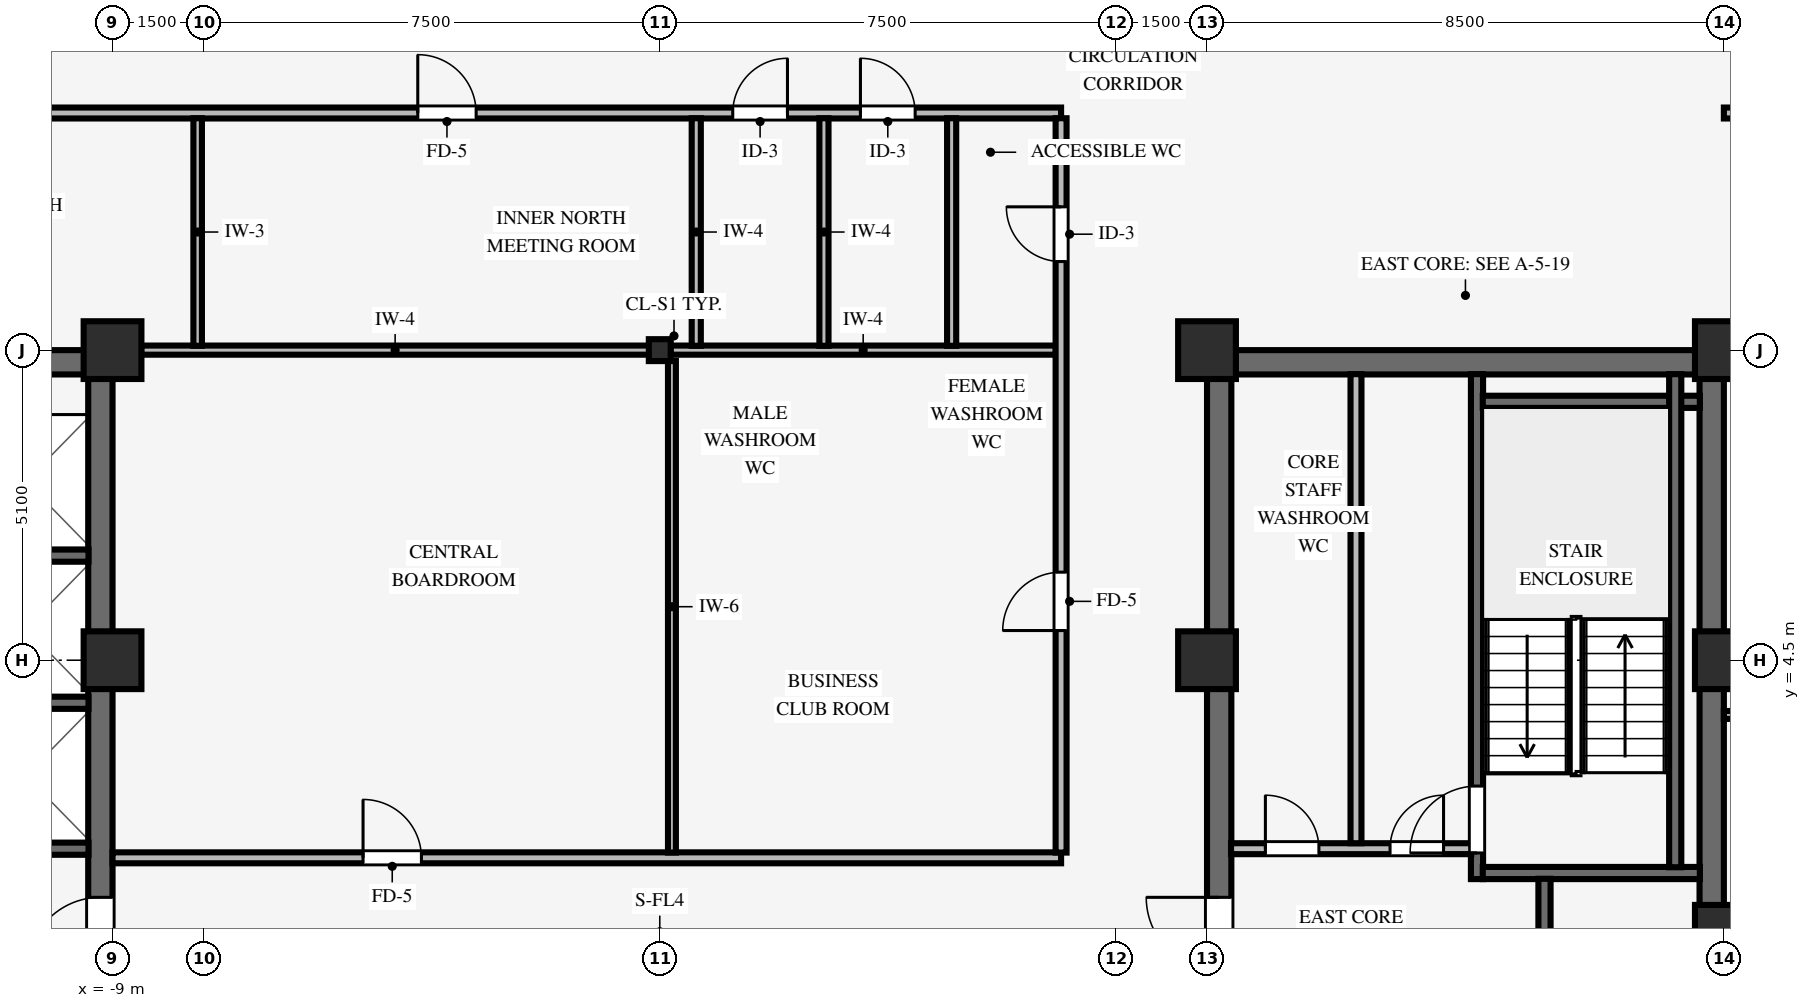
"""IFC4 building model, lengths in metres.
Left out: names, types, materials, properties, quantities, classifications, styles, units other than length and angle.
Written with IfcOpenShell. Run it as: python <this file> out.ifc"""

import sys

from ifc_helpers import new_model, si_unit, direction, frame, frame_2d, origin, origin_2d, place, context, subcontext, project, spatial, rectangle, i_section, extrude, source, transform, mapped, element, fill, save


model = new_model("IFC4")
c1 = context("Model", 3, precision=1e-05, world=origin(), true_north=direction((0.0, 1.0)))
c2 = subcontext(c1, "Body", "Model", "MODEL_VIEW")
j1 = project(units=[si_unit("LENGTHUNIT", "METRE"), si_unit("PLANEANGLEUNIT", "RADIAN")], contexts=[c1])
p1 = place(None, origin())
s1 = spatial("IfcSite", under=j1, at=p1, CompositionType="ELEMENT")
p2 = place(p1, origin())
s2 = spatial("IfcBuilding", under=s1, at=p2, CompositionType="ELEMENT")
p3 = place(p2, frame((0.0, 0.0, 142.1)))
s3 = spatial("IfcBuildingStorey", under=s2, at=p3, CompositionType="ELEMENT", Elevation=142.1)
p4 = place(p3, frame((-17.5, 9.4, 0.0), z_axis=(0.0, 0.0, 1.0), x_axis=(1.0, 0.0, 0.0)))
e1 = element("IfcWall", 1, at=p4, inside=s3, PredefinedType="SHEAR", context=c2, shape_type="SweptSolid", body=[
    extrude(rectangle(XDim=8.5, YDim=0.4, at=frame_2d((4.25, 0.0))), origin(), (0.0, 0.0, 1.0), 3.37),
])
p5 = place(p3, frame((-9.2, -9.205, 0.0), z_axis=(0.0, 0.0, 1.0), x_axis=(0.0, 1.0, 0.0)))
e2 = element("IfcWall", 2, at=p5, inside=s3, PredefinedType="SHEAR", context=c2, shape_type="SweptSolid", body=[
    extrude(rectangle(XDim=18.41, YDim=0.4, at=frame_2d((9.205, 0.0))), origin(), (0.0, 0.0, 1.0), 3.37),
])
p6 = place(p5, frame((8.605, 0.0, 0.0)))
e3 = element("IfcOpeningElement", 3, at=p6, cuts=e2, PredefinedType="OPENING", context=c2, shape_type="SweptSolid", body=[
    extrude(rectangle(XDim=1.2, YDim=2.15, at=frame_2d((0.6, 1.075))), frame((0.0, 0.21, 0.0), z_axis=(0.0, -1.0, 0.0), x_axis=(1.0, 0.0, 0.0)), (0.0, 0.0, 1.0), 0.42),
])
p7 = place(p3, frame((9.0, 9.4, 0.0), z_axis=(0.0, 0.0, 1.0), x_axis=(1.0, 0.0, 0.0)))
e4 = element("IfcWall", 4, at=p7, inside=s3, PredefinedType="SHEAR", context=c2, shape_type="SweptSolid", body=[
    extrude(rectangle(XDim=8.5, YDim=0.4, at=frame_2d((4.25, 0.0))), origin(), (0.0, 0.0, 1.0), 3.37),
])
p8 = place(p3, frame((9.2, -9.205, 0.0), z_axis=(0.0, 0.0, 1.0), x_axis=(0.0, 1.0, 0.0)))
e5 = element("IfcWall", 5, at=p8, inside=s3, PredefinedType="SHEAR", context=c2, shape_type="SweptSolid", body=[
    extrude(rectangle(XDim=18.41, YDim=0.4, at=frame_2d((9.205, 0.0))), origin(), (0.0, 0.0, 1.0), 3.37),
])
p9 = place(p8, frame((8.605, 0.0, 0.0)))
e6 = element("IfcOpeningElement", 6, at=p9, cuts=e5, PredefinedType="OPENING", context=c2, shape_type="SweptSolid", body=[
    extrude(rectangle(XDim=1.2, YDim=2.15, at=frame_2d((0.6, 1.075))), frame((0.0, 0.21, 0.0), z_axis=(0.0, -1.0, 0.0), x_axis=(1.0, 0.0, 0.0)), (0.0, 0.0, 1.0), 0.42),
])
p10 = place(p3, frame((17.3, -9.205, 0.0), z_axis=(0.0, 0.0, 1.0), x_axis=(0.0, 1.0, 0.0)))
e7 = element("IfcWall", 7, at=p10, inside=s3, PredefinedType="SHEAR", context=c2, shape_type="SweptSolid", body=[
    extrude(rectangle(XDim=18.41, YDim=0.4, at=frame_2d((9.205, 0.0))), origin(), (0.0, 0.0, 1.0), 3.37),
])
for number, where, z_axis, x_axis in (
    (8, (-9.0, 4.5, 0.0), (0.0, 0.0, 1.0), (1.0, 0.0, 0.0)),
    (9, (-9.0, 9.6, 0.0), (0.0, 0.0, 1.0), (1.0, 0.0, 0.0)),
    (10, (9.0, 4.5, 0.0), (0.0, 0.0, 1.0), (1.0, 0.0, 0.0)),
    (11, (9.0, 9.6, 0.0), (0.0, 0.0, 1.0), (1.0, 0.0, 0.0)),
    (12, (17.5, 4.5, 0.0), (0.0, 0.0, 1.0), (1.0, 0.0, 0.0)),
    (13, (17.5, 9.6, 0.0), (0.0, 0.0, 1.0), (1.0, 0.0, 0.0)),
    (14, (17.5, 0.0, 0.0), (0.0, 0.0, 1.0), (1.0, 0.0, 0.0)),
):
    element("IfcColumn", number, at=place(p3, frame(where, z_axis=z_axis, x_axis=x_axis)), inside=s3, PredefinedType="COLUMN", context=c2, shape_type="SweptSolid", body=[
        extrude(rectangle(XDim=0.95, YDim=0.95, at=origin_2d()), origin(), (0.0, 0.0, 1.0), 3.37),
    ])
p11 = place(p3, frame((0.0, 9.6, 0.0), z_axis=(0.0, 0.0, 1.0), x_axis=(1.0, 0.0, 0.0)))
e15 = element("IfcColumn", 15, at=p11, inside=s3, PredefinedType="COLUMN", context=c2, shape_type="SweptSolid", body=[
    extrude(i_section(OverallWidth=0.36, OverallDepth=0.36, WebThickness=0.021, FlangeThickness=0.021, FilletRadius=0.018, at=origin_2d()), origin(), (0.0, 0.0, 1.0), 3.37),
])
for number, where, z_axis, x_axis in (
    (16, (-11.505, 1.4, 0.0), (0.0, 0.0, 1.0), (1.0, 0.0, 0.0)),
    (17, (-11.505, 3.8, 0.0), (0.0, 0.0, 1.0), (1.0, 0.0, 0.0)),
    (18, (-11.505, 6.22, 0.0), (0.0, 0.0, 1.0), (1.0, 0.0, 0.0)),
):
    element("IfcWall", number, at=place(p3, frame(where, z_axis=z_axis, x_axis=x_axis)), inside=s3, PredefinedType="SHEAR", context=c2, shape_type="SweptSolid", body=[
        extrude(rectangle(XDim=2.11, YDim=0.2, at=frame_2d((1.055, 0.0))), origin(), (0.0, 0.0, 1.0), 3.37),
    ])
p12 = place(p3, frame((13.44, 0.9, 0.0), z_axis=(0.0, 0.0, 1.0), x_axis=(0.0, 1.0, 0.0)))
e19 = element("IfcWall", 19, at=p12, inside=s3, PredefinedType="SHEAR", context=c2, shape_type="SweptSolid", body=[
    extrude(rectangle(XDim=8.305, YDim=0.2, at=frame_2d((4.153, 0.0))), origin(), (0.0, 0.0, 1.0), 3.37),
])
p13 = place(p12, frame((0.43, 0.0, 0.0)))
e20 = element("IfcOpeningElement", 20, at=p13, cuts=e19, PredefinedType="OPENING", context=c2, shape_type="SweptSolid", body=[
    extrude(rectangle(XDim=1.1, YDim=2.15, at=frame_2d((0.55, 1.075))), frame((0.0, 0.11, 0.0), z_axis=(0.0, -1.0, 0.0), x_axis=(1.0, 0.0, 0.0)), (0.0, 0.0, 1.0), 0.22),
])
for number, where, z_axis, x_axis in (
    (21, (13.535, 1.0, 0.0), (0.0, 0.0, 1.0), (1.0, 0.0, 0.0)),
    (22, (13.535, 8.75, 0.0), (0.0, 0.0, 1.0), (1.0, 0.0, 0.0)),
):
    element("IfcWall", number, at=place(p3, frame(where, z_axis=z_axis, x_axis=x_axis)), inside=s3, PredefinedType="SHEAR", context=c2, shape_type="SweptSolid", body=[
        extrude(rectangle(XDim=3.57, YDim=0.2, at=frame_2d((1.785, 0.0))), origin(), (0.0, 0.0, 1.0), 3.37),
    ])
p14 = place(p3, frame((16.7, 1.095, 0.0), z_axis=(0.0, 0.0, 1.0), x_axis=(0.0, 1.0, 0.0)))
e23 = element("IfcWall", 23, at=p14, inside=s3, PredefinedType="SHEAR", context=c2, shape_type="SweptSolid", body=[
    extrude(rectangle(XDim=8.11, YDim=0.2, at=frame_2d((4.055, 0.0))), origin(), (0.0, 0.0, 1.0), 3.37),
])
p15 = place(p3, frame((14.55, -9.205, 0.0), z_axis=(0.0, 0.0, 1.0), x_axis=(0.0, 1.0, 0.0)))
e24 = element("IfcWall", 24, at=p15, inside=s3, PredefinedType="SHEAR", context=c2, shape_type="SweptSolid", body=[
    extrude(rectangle(XDim=10.11, YDim=0.2, at=frame_2d((5.055, 0.0))), origin(), (0.0, 0.0, 1.0), 3.37),
])
p16 = place(p15, frame((6.565, 0.0, 0.0)))
e25 = element("IfcOpeningElement", 25, at=p16, cuts=e24, PredefinedType="OPENING", context=c2, shape_type="SweptSolid", body=[
    extrude(rectangle(XDim=0.88, YDim=2.1, at=frame_2d((0.44, 1.05))), frame((0.0, 0.11, 0.0), z_axis=(0.0, -1.0, 0.0), x_axis=(1.0, 0.0, 0.0)), (0.0, 0.0, 1.0), 0.22),
])
p17 = place(p15, frame((0.93, 0.0, 0.0)))
e26 = element("IfcOpeningElement", 26, at=p17, cuts=e24, PredefinedType="OPENING", context=c2, shape_type="SweptSolid", body=[
    extrude(rectangle(XDim=1.15, YDim=2.15, at=frame_2d((0.575, 1.075))), frame((0.0, 0.11, 0.0), z_axis=(0.0, -1.0, 0.0), x_axis=(1.0, 0.0, 0.0)), (0.0, 0.0, 1.0), 0.22),
])
p18 = place(p3, frame((9.395, 1.4, 0.0), z_axis=(0.0, 0.0, 1.0), x_axis=(1.0, 0.0, 0.0)))
e27 = element("IfcWall", 27, at=p18, inside=s3, PredefinedType="PARTITIONING", context=c2, shape_type="SweptSolid", body=[
    extrude(rectangle(XDim=3.95, YDim=0.18, at=frame_2d((1.975, 0.0))), origin(), (0.0, 0.0, 1.0), 3.36),
])
p19 = place(p18, frame((0.565, 0.0, 0.0)))
e28 = element("IfcOpeningElement", 28, at=p19, cuts=e27, PredefinedType="OPENING", context=c2, shape_type="SweptSolid", body=[
    extrude(rectangle(XDim=0.88, YDim=2.1, at=frame_2d((0.44, 1.05))), frame((0.0, 0.1, 0.0), z_axis=(0.0, -1.0, 0.0), x_axis=(1.0, 0.0, 0.0)), (0.0, 0.0, 1.0), 0.2),
])
p20 = place(p18, frame((2.615, 0.0, 0.0)))
e29 = element("IfcOpeningElement", 29, at=p20, cuts=e27, PredefinedType="OPENING", context=c2, shape_type="SweptSolid", body=[
    extrude(rectangle(XDim=0.88, YDim=2.1, at=frame_2d((0.44, 1.05))), frame((0.0, 0.1, 0.0), z_axis=(0.0, -1.0, 0.0), x_axis=(1.0, 0.0, 0.0)), (0.0, 0.0, 1.0), 0.2),
])
p21 = place(p3, frame((11.45, 1.49, 0.0), z_axis=(0.0, 0.0, 1.0), x_axis=(0.0, 1.0, 0.0)))
e30 = element("IfcWall", 30, at=p21, inside=s3, PredefinedType="PARTITIONING", context=c2, shape_type="SweptSolid", body=[
    extrude(rectangle(XDim=7.715, YDim=0.18, at=frame_2d((3.857, 0.0))), origin(), (0.0, 0.0, 1.0), 3.36),
])
p22 = place(p3, frame((-9.0, 1.25, 0.0), z_axis=(0.0, 0.0, 1.0), x_axis=(1.0, 0.0, 0.0)))
e31 = element("IfcWall", 31, at=p22, inside=s3, PredefinedType="PARTITIONING", context=c2, shape_type="SweptSolid", body=[
    extrude(rectangle(XDim=15.6, YDim=0.18, at=frame_2d((7.8, 0.0))), origin(), (0.0, 0.0, 1.0), 3.36),
])
p23 = place(p22, frame((4.12, 0.0, 0.0)))
e32 = element("IfcOpeningElement", 32, at=p23, cuts=e31, PredefinedType="OPENING", context=c2, shape_type="SweptSolid", body=[
    extrude(rectangle(XDim=0.96, YDim=2.1, at=frame_2d((0.48, 1.05))), frame((0.0, 0.1, 0.0), z_axis=(0.0, -1.0, 0.0), x_axis=(1.0, 0.0, 0.0)), (0.0, 0.0, 1.0), 0.2),
])
p24 = place(p3, frame((17.5, 3.6, 0.0), z_axis=(0.0, 0.0, 1.0), x_axis=(1.0, 0.0, 0.0)))
e33 = element("IfcWall", 33, at=p24, inside=s3, PredefinedType="PARTITIONING", context=c2, shape_type="SweptSolid", body=[
    extrude(rectangle(XDim=8.58, YDim=0.13, at=frame_2d((4.29, 0.0))), origin(), (0.0, 0.0, 1.0), 3.36),
])
p25 = place(p3, frame((-8.529, 9.6, 0.0), z_axis=(0.0, 0.0, 1.0), x_axis=(1.0, 0.0, 0.0)))
e34 = element("IfcWall", 34, at=p25, inside=s3, PredefinedType="PARTITIONING", context=c2, shape_type="SweptSolid", body=[
    extrude(rectangle(XDim=8.353, YDim=0.15, at=frame_2d((4.177, 0.0))), origin(), (0.0, 0.0, 1.0), 2.405),
])
p26 = place(p3, frame((0.176, 9.6, 0.0), z_axis=(0.0, 0.0, 1.0), x_axis=(1.0, 0.0, 0.0)))
e35 = element("IfcWall", 35, at=p26, inside=s3, PredefinedType="PARTITIONING", context=c2, shape_type="SweptSolid", body=[
    extrude(rectangle(XDim=6.338, YDim=0.15, at=frame_2d((3.169, 0.0))), origin(), (0.0, 0.0, 1.0), 2.405),
])
p27 = place(p3, frame((-17.7, 13.5, 0.0), z_axis=(0.0, 0.0, 1.0), x_axis=(1.0, 0.0, 0.0)))
e36 = element("IfcWall", 36, at=p27, inside=s3, PredefinedType="PARTITIONING", context=c2, shape_type="SweptSolid", body=[
    extrude(rectangle(XDim=24.3, YDim=0.18, at=frame_2d((12.15, 0.0))), origin(), (0.0, 0.0, 1.0), 2.998),
])
p28 = place(p27, frame((4.57, 0.0, 0.0)))
e37 = element("IfcOpeningElement", 37, at=p28, cuts=e36, PredefinedType="OPENING", context=c2, shape_type="SweptSolid", body=[
    extrude(rectangle(XDim=0.96, YDim=2.1, at=frame_2d((0.48, 1.05))), frame((0.0, 0.1, 0.0), z_axis=(0.0, -1.0, 0.0), x_axis=(1.0, 0.0, 0.0)), (0.0, 0.0, 1.0), 0.2),
])
p29 = place(p27, frame((13.72, 0.0, 0.0)))
e38 = element("IfcOpeningElement", 38, at=p29, cuts=e36, PredefinedType="OPENING", context=c2, shape_type="SweptSolid", body=[
    extrude(rectangle(XDim=0.96, YDim=2.1, at=frame_2d((0.48, 1.05))), frame((0.0, 0.1, 0.0), z_axis=(0.0, -1.0, 0.0), x_axis=(1.0, 0.0, 0.0)), (0.0, 0.0, 1.0), 0.2),
])
p30 = place(p27, frame((18.9, 0.0, 0.0)))
e39 = element("IfcOpeningElement", 39, at=p30, cuts=e36, PredefinedType="OPENING", context=c2, shape_type="SweptSolid", body=[
    extrude(rectangle(XDim=0.9, YDim=2.1, at=frame_2d((0.45, 1.05))), frame((0.0, 0.1, 0.0), z_axis=(0.0, -1.0, 0.0), x_axis=(1.0, 0.0, 0.0)), (0.0, 0.0, 1.0), 0.2),
])
p31 = place(p27, frame((21.0, 0.0, 0.0)))
e40 = element("IfcOpeningElement", 40, at=p31, cuts=e36, PredefinedType="OPENING", context=c2, shape_type="SweptSolid", body=[
    extrude(rectangle(XDim=0.9, YDim=2.1, at=frame_2d((0.45, 1.05))), frame((0.0, 0.1, 0.0), z_axis=(0.0, -1.0, 0.0), x_axis=(1.0, 0.0, 0.0)), (0.0, 0.0, 1.0), 0.2),
])
p32 = place(p3, frame((17.5, 13.5, 0.0), z_axis=(0.0, 0.0, 1.0), x_axis=(1.0, 0.0, 0.0)))
e41 = element("IfcWall", 41, at=p32, inside=s3, PredefinedType="PARTITIONING", context=c2, shape_type="SweptSolid", body=[
    extrude(rectangle(XDim=3.3, YDim=0.18, at=frame_2d((1.65, 0.0))), origin(), (0.0, 0.0, 1.0), 2.998),
])
p33 = place(p3, frame((-7.6, 9.671, 0.0), z_axis=(0.0, 0.0, 1.0), x_axis=(0.0, 1.0, 0.0)))
e42 = element("IfcWall", 42, at=p33, inside=s3, PredefinedType="PARTITIONING", context=c2, shape_type="SweptSolid", body=[
    extrude(rectangle(XDim=3.743, YDim=0.14, at=frame_2d((1.872, 0.0))), origin(), (0.0, 0.0, 1.0), 3.36),
])
p34 = place(p3, frame((0.2, 1.336, 0.0), z_axis=(0.0, 0.0, 1.0), x_axis=(0.0, 1.0, 0.0)))
e43 = element("IfcWall", 43, at=p34, inside=s3, PredefinedType="PARTITIONING", context=c2, shape_type="SweptSolid", body=[
    extrude(rectangle(XDim=8.088, YDim=0.13, at=frame_2d((4.044, 0.0))), origin(), (0.0, 0.0, 1.0), 2.816),
])
for number, where, z_axis, x_axis in (
    (44, (0.6, 9.671, 0.0), (0.0, 0.0, 1.0), (0.0, 1.0, 0.0)),
    (45, (2.7, 9.671, 0.0), (0.0, 0.0, 1.0), (0.0, 1.0, 0.0)),
    (46, (4.8, 9.671, 0.0), (0.0, 0.0, 1.0), (0.0, 1.0, 0.0)),
):
    element("IfcWall", number, at=place(p3, frame(where, z_axis=z_axis, x_axis=x_axis)), inside=s3, PredefinedType="PARTITIONING", context=c2, shape_type="SweptSolid", body=[
        extrude(rectangle(XDim=3.743, YDim=0.15, at=frame_2d((1.872, 0.0))), origin(), (0.0, 0.0, 1.0), 3.36),
    ])
p35 = place(p3, frame((6.6, 1.336, 0.0), z_axis=(0.0, 0.0, 1.0), x_axis=(0.0, 1.0, 0.0)))
e47 = element("IfcWall", 47, at=p35, inside=s3, PredefinedType="PARTITIONING", context=c2, shape_type="SweptSolid", body=[
    extrude(rectangle(XDim=12.078, YDim=0.18, at=frame_2d((6.039, 0.0))), origin(), (0.0, 0.0, 1.0), 3.36),
])
p36 = place(p35, frame((3.652, 0.0, 0.0)))
e48 = element("IfcOpeningElement", 48, at=p36, cuts=e47, PredefinedType="OPENING", context=c2, shape_type="SweptSolid", body=[
    extrude(rectangle(XDim=0.96, YDim=2.1, at=frame_2d((0.48, 1.05))), frame((0.0, 0.1, 0.0), z_axis=(0.0, -1.0, 0.0), x_axis=(1.0, 0.0, 0.0)), (0.0, 0.0, 1.0), 0.2),
])
p37 = place(p35, frame((9.721, 0.0, 0.0)))
e49 = element("IfcOpeningElement", 49, at=p37, cuts=e47, PredefinedType="OPENING", context=c2, shape_type="SweptSolid", body=[
    extrude(rectangle(XDim=0.9, YDim=2.1, at=frame_2d((0.45, 1.05))), frame((0.0, 0.1, 0.0), z_axis=(0.0, -1.0, 0.0), x_axis=(1.0, 0.0, 0.0)), (0.0, 0.0, 1.0), 0.2),
])
m1 = source(origin(), c2, "Body", "SweptSolid", [
    extrude(rectangle(XDim=1.1, YDim=2.15, at=frame_2d((0.55, 1.075))), frame((0.0, 0.025, 0.0), z_axis=(0.0, -1.0, 0.0), x_axis=(1.0, 0.0, 0.0)), (0.0, 0.0, 1.0), 0.05),
])
p38 = place(p13, origin())
e50 = element("IfcDoor", 50, at=p38, inside=s3, OperationType="SINGLE_SWING_LEFT", PredefinedType="DOOR", context=c2, shape_type="MappedRepresentation", body=[
    mapped(m1, transform((0.0, 0.0, 0.0), scale=1.0)),
])
fill(e20, e50)
m2 = source(origin(), c2, "Body", "SweptSolid", [
    extrude(rectangle(XDim=1.2, YDim=2.15, at=frame_2d((0.6, 1.075))), frame((0.0, 0.025, 0.0), z_axis=(0.0, -1.0, 0.0), x_axis=(1.0, 0.0, 0.0)), (0.0, 0.0, 1.0), 0.05),
])
p39 = place(p6, origin())
e51 = element("IfcDoor", 51, at=p39, inside=s3, OperationType="SINGLE_SWING_LEFT", PredefinedType="DOOR", context=c2, shape_type="MappedRepresentation", body=[
    mapped(m2, transform((0.0, 0.0, 0.0), scale=1.0)),
])
fill(e3, e51)
p40 = place(p9, origin())
e52 = element("IfcDoor", 52, at=p40, inside=s3, OperationType="SINGLE_SWING_RIGHT", PredefinedType="DOOR", context=c2, shape_type="MappedRepresentation", body=[
    mapped(m2, transform((0.0, 0.0, 0.0), scale=1.0)),
])
fill(e6, e52)
m3 = source(origin(), c2, "Body", "SweptSolid", [
    extrude(rectangle(XDim=0.88, YDim=2.1, at=frame_2d((0.44, 1.05))), frame((0.0, 0.025, 0.0), z_axis=(0.0, -1.0, 0.0), x_axis=(1.0, 0.0, 0.0)), (0.0, 0.0, 1.0), 0.05),
])
p41 = place(p19, origin())
e53 = element("IfcDoor", 53, at=p41, inside=s3, OperationType="SINGLE_SWING_LEFT", PredefinedType="DOOR", context=c2, shape_type="MappedRepresentation", body=[
    mapped(m3, transform((0.0, 0.0, 0.0), scale=1.0)),
])
fill(e28, e53)
p42 = place(p20, origin())
e54 = element("IfcDoor", 54, at=p42, inside=s3, OperationType="SINGLE_SWING_RIGHT", PredefinedType="DOOR", context=c2, shape_type="MappedRepresentation", body=[
    mapped(m3, transform((0.0, 0.0, 0.0), scale=1.0)),
])
fill(e29, e54)
m4 = source(origin(), c2, "Body", "SweptSolid", [
    extrude(rectangle(XDim=0.96, YDim=2.1, at=frame_2d((0.48, 1.05))), frame((0.0, 0.025, 0.0), z_axis=(0.0, -1.0, 0.0), x_axis=(1.0, 0.0, 0.0)), (0.0, 0.0, 1.0), 0.05),
])
p43 = place(p23, origin())
e55 = element("IfcDoor", 55, at=p43, inside=s3, OperationType="SINGLE_SWING_LEFT", PredefinedType="DOOR", context=c2, shape_type="MappedRepresentation", body=[
    mapped(m4, transform((0.0, 0.0, 0.0), scale=1.0)),
])
fill(e32, e55)
p44 = place(p36, origin())
e56 = element("IfcDoor", 56, at=p44, inside=s3, OperationType="SINGLE_SWING_LEFT", PredefinedType="DOOR", context=c2, shape_type="MappedRepresentation", body=[
    mapped(m4, transform((0.0, 0.0, 0.0), scale=1.0)),
])
fill(e48, e56)
p45 = place(p29, origin())
e57 = element("IfcDoor", 57, at=p45, inside=s3, OperationType="SINGLE_SWING_LEFT", PredefinedType="DOOR", context=c2, shape_type="MappedRepresentation", body=[
    mapped(m4, transform((0.0, 0.0, 0.0), scale=1.0)),
])
fill(e38, e57)
m5 = source(origin(), c2, "Body", "SweptSolid", [
    extrude(rectangle(XDim=0.9, YDim=2.1, at=frame_2d((0.45, 1.05))), frame((0.0, 0.025, 0.0), z_axis=(0.0, -1.0, 0.0), x_axis=(1.0, 0.0, 0.0)), (0.0, 0.0, 1.0), 0.05),
])
p46 = place(p37, origin())
e58 = element("IfcDoor", 58, at=p46, inside=s3, OperationType="SINGLE_SWING_RIGHT", PredefinedType="DOOR", context=c2, shape_type="MappedRepresentation", body=[
    mapped(m5, transform((0.0, 0.0, 0.0), scale=1.0)),
])
fill(e49, e58)
p47 = place(p30, origin())
e59 = element("IfcDoor", 59, at=p47, inside=s3, OperationType="SINGLE_SWING_RIGHT", PredefinedType="DOOR", context=c2, shape_type="MappedRepresentation", body=[
    mapped(m5, transform((0.0, 0.0, 0.0), scale=1.0)),
])
fill(e39, e59)
p48 = place(p31, origin())
e60 = element("IfcDoor", 60, at=p48, inside=s3, OperationType="SINGLE_SWING_LEFT", PredefinedType="DOOR", context=c2, shape_type="MappedRepresentation", body=[
    mapped(m5, transform((0.0, 0.0, 0.0), scale=1.0)),
])
fill(e40, e60)
save(model, sys.argv[1])
